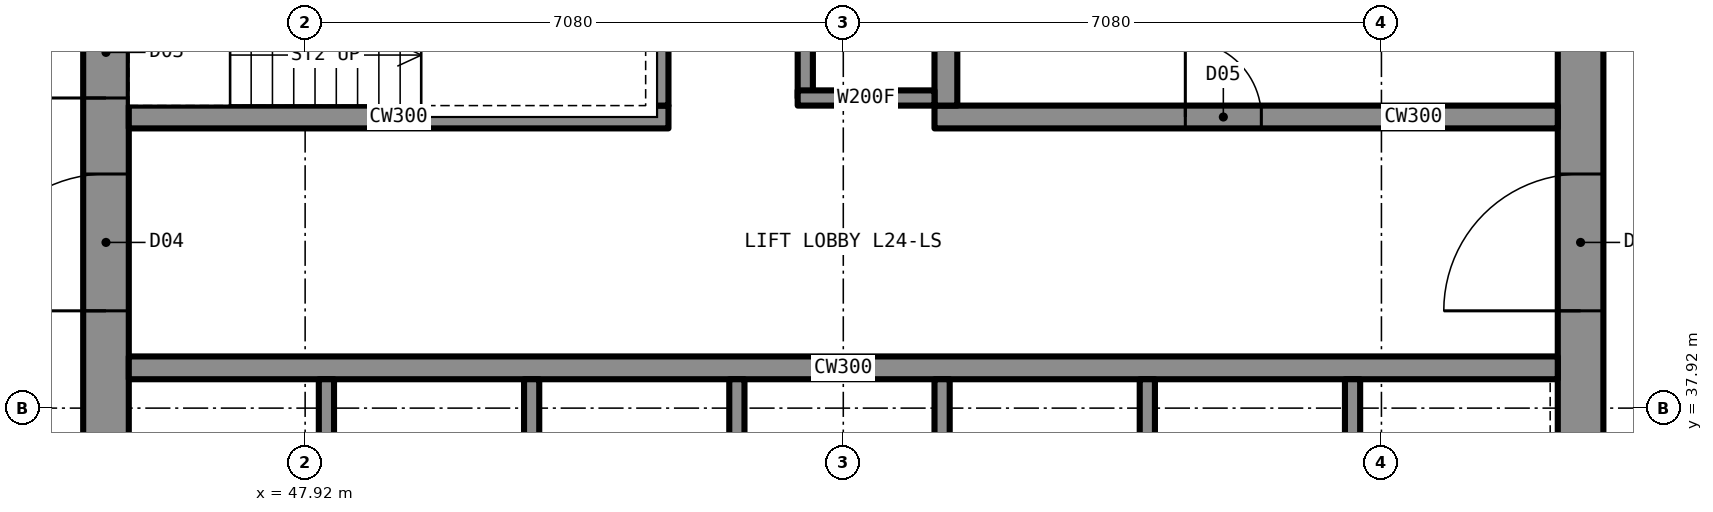
"""IFC4 building model, lengths in metres.
Left out: names, types, materials, properties, quantities, classifications, styles, units other than length and angle.
Written with IfcOpenShell. Run it as: python <this file> out.ifc"""

import sys

from ifc_helpers import new_model, si_unit, direction, frame, frame_2d, origin, place, context, subcontext, project, spatial, rectangle, extrude, element, fill, save


model = new_model("IFC4")
c1 = context("Model", 3, precision=1e-05, world=origin(), true_north=direction((0.0, 1.0)))
c2 = subcontext(c1, "Body", "Model", "MODEL_VIEW")
j1 = project(units=[si_unit("LENGTHUNIT", "METRE"), si_unit("PLANEANGLEUNIT", "RADIAN")], contexts=[c1])
p1 = place(None, origin())
s1 = spatial("IfcSite", under=j1, at=p1, CompositionType="ELEMENT")
p2 = place(p1, origin())
s2 = spatial("IfcBuilding", under=s1, at=p2, CompositionType="ELEMENT")
p3 = place(p2, frame((0.0, 0.0, 93.4)))
s3 = spatial("IfcBuildingStorey", under=s2, at=p3, CompositionType="ELEMENT", Elevation=93.4)
p4 = place(p3, frame((64.7, 35.6, 0.0), z_axis=(0.0, 0.0, 1.0), x_axis=(0.0, 1.0, 0.0)))
e1 = element("IfcWall", 1, at=p4, inside=s3, PredefinedType="SHEAR", context=c2, shape_type="SweptSolid", body=[
    extrude(rectangle(XDim=18.8, YDim=0.6, at=frame_2d((9.4, 0.0))), origin(), (0.0, 0.0, 1.0), 3.5),
])
p5 = place(p4, frame((13.4, 0.0, 0.0)))
e2 = element("IfcOpeningElement", 2, at=p5, cuts=e1, PredefinedType="OPENING", context=c2, shape_type="SweptSolid", body=[
    extrude(rectangle(XDim=1.8, YDim=2.2, at=frame_2d((0.9, 1.1))), frame((0.0, 0.31, 0.0), z_axis=(0.0, -1.0, 0.0), x_axis=(1.0, 0.0, 0.0)), (0.0, 0.0, 1.0), 0.62),
])
p6 = place(p4, frame((3.6, 0.0, 0.0)))
e3 = element("IfcOpeningElement", 3, at=p6, cuts=e1, PredefinedType="OPENING", context=c2, shape_type="SweptSolid", body=[
    extrude(rectangle(XDim=1.8, YDim=2.2, at=frame_2d((0.9, 1.1))), frame((0.0, 0.31, 0.0), z_axis=(0.0, -1.0, 0.0), x_axis=(1.0, 0.0, 0.0)), (0.0, 0.0, 1.0), 0.62),
])
p7 = place(p3, frame((45.3, 35.6, 0.0), z_axis=(0.0, 0.0, 1.0), x_axis=(0.0, 1.0, 0.0)))
e4 = element("IfcWall", 4, at=p7, inside=s3, PredefinedType="SHEAR", context=c2, shape_type="SweptSolid", body=[
    extrude(rectangle(XDim=18.8, YDim=0.6, at=frame_2d((9.4, 0.0))), origin(), (0.0, 0.0, 1.0), 3.5),
])
p8 = place(p7, frame((13.4, 0.0, 0.0)))
e5 = element("IfcOpeningElement", 5, at=p8, cuts=e4, PredefinedType="OPENING", context=c2, shape_type="SweptSolid", body=[
    extrude(rectangle(XDim=1.8, YDim=2.2, at=frame_2d((0.9, 1.1))), frame((0.0, 0.31, 0.0), z_axis=(0.0, -1.0, 0.0), x_axis=(1.0, 0.0, 0.0)), (0.0, 0.0, 1.0), 0.62),
])
p9 = place(p7, frame((3.6, 0.0, 0.0)))
e6 = element("IfcOpeningElement", 6, at=p9, cuts=e4, PredefinedType="OPENING", context=c2, shape_type="SweptSolid", body=[
    extrude(rectangle(XDim=1.8, YDim=2.2, at=frame_2d((0.9, 1.1))), frame((0.0, 0.31, 0.0), z_axis=(0.0, -1.0, 0.0), x_axis=(1.0, 0.0, 0.0)), (0.0, 0.0, 1.0), 0.62),
])
p10 = place(p7, frame((6.4, 0.0, 0.0)))
e7 = element("IfcOpeningElement", 7, at=p10, cuts=e4, PredefinedType="OPENING", context=c2, shape_type="SweptSolid", body=[
    extrude(rectangle(XDim=1.2, YDim=2.2, at=frame_2d((0.6, 1.1))), frame((0.0, 0.31, 0.0), z_axis=(0.0, -1.0, 0.0), x_axis=(1.0, 0.0, 0.0)), (0.0, 0.0, 1.0), 0.62),
])
p11 = place(p3, frame((45.6, 38.45, 0.0), z_axis=(0.0, 0.0, 1.0), x_axis=(1.0, 0.0, 0.0)))
e8 = element("IfcWall", 8, at=p11, inside=s3, PredefinedType="SHEAR", context=c2, shape_type="SweptSolid", body=[
    extrude(rectangle(XDim=18.8, YDim=0.3, at=frame_2d((9.4, 0.0))), origin(), (0.0, 0.0, 1.0), 3.5),
])
p12 = place(p3, frame((45.6, 41.75, 0.0), z_axis=(0.0, 0.0, 1.0), x_axis=(1.0, 0.0, 0.0)))
e9 = element("IfcWall", 9, at=p12, inside=s3, PredefinedType="SHEAR", context=c2, shape_type="SweptSolid", body=[
    extrude(rectangle(XDim=7.1, YDim=0.3, at=frame_2d((3.55, 0.0))), origin(), (0.0, 0.0, 1.0), 3.5),
])
p13 = place(p3, frame((56.2, 41.75, 0.0), z_axis=(0.0, 0.0, 1.0), x_axis=(1.0, 0.0, 0.0)))
e10 = element("IfcWall", 10, at=p13, inside=s3, PredefinedType="SHEAR", context=c2, shape_type="SweptSolid", body=[
    extrude(rectangle(XDim=8.2, YDim=0.3, at=frame_2d((4.1, 0.0))), origin(), (0.0, 0.0, 1.0), 3.5),
])
p14 = place(p13, frame((3.3, 0.0, 0.0)))
e11 = element("IfcOpeningElement", 11, at=p14, cuts=e10, PredefinedType="OPENING", context=c2, shape_type="SweptSolid", body=[
    extrude(rectangle(XDim=1.0, YDim=2.1, at=frame_2d((0.5, 1.05))), frame((0.0, 0.16, 0.0), z_axis=(0.0, -1.0, 0.0), x_axis=(1.0, 0.0, 0.0)), (0.0, 0.0, 1.0), 0.32),
])
p15 = place(p3, frame((52.55, 41.9, 0.0), z_axis=(0.0, 0.0, 1.0), x_axis=(0.0, 1.0, 0.0)))
e12 = element("IfcWall", 12, at=p15, inside=s3, PredefinedType="SHEAR", context=c2, shape_type="SweptSolid", body=[
    extrude(rectangle(XDim=6.2, YDim=0.3, at=frame_2d((3.1, 0.0))), origin(), (0.0, 0.0, 1.0), 3.5),
])
p16 = place(p15, frame((4.125, 0.0, 0.0)))
e13 = element("IfcOpeningElement", 13, at=p16, cuts=e12, PredefinedType="OPENING", context=c2, shape_type="SweptSolid", body=[
    extrude(rectangle(XDim=1.2, YDim=2.2, at=frame_2d((0.6, 1.1))), frame((0.0, 0.16, 0.0), z_axis=(0.0, -1.0, 0.0), x_axis=(1.0, 0.0, 0.0)), (0.0, 0.0, 1.0), 0.32),
])
p17 = place(p3, frame((56.35, 41.9, 0.0), z_axis=(0.0, 0.0, 1.0), x_axis=(0.0, 1.0, 0.0)))
e14 = element("IfcWall", 14, at=p17, inside=s3, PredefinedType="SHEAR", context=c2, shape_type="SweptSolid", body=[
    extrude(rectangle(XDim=9.5, YDim=0.3, at=frame_2d((4.75, 0.0))), origin(), (0.0, 0.0, 1.0), 3.5),
])
p18 = place(p17, frame((7.1, 0.0, 0.0)))
e15 = element("IfcOpeningElement", 15, at=p18, cuts=e14, PredefinedType="OPENING", context=c2, shape_type="SweptSolid", body=[
    extrude(rectangle(XDim=1.8, YDim=2.2, at=frame_2d((0.9, 1.1))), frame((0.0, 0.16, 0.0), z_axis=(0.0, -1.0, 0.0), x_axis=(1.0, 0.0, 0.0)), (0.0, 0.0, 1.0), 0.32),
])
p19 = place(p3, frame((54.5, 42.0, 0.0), z_axis=(0.0, 0.0, 1.0), x_axis=(0.0, 1.0, 0.0)))
e16 = element("IfcWall", 16, at=p19, inside=s3, PredefinedType="PARTITIONING", context=c2, shape_type="SweptSolid", body=[
    extrude(rectangle(XDim=3.1, YDim=0.2, at=frame_2d((1.55, 0.0))), origin(), (0.0, 0.0, 1.0), 3.33),
])
p20 = place(p19, frame((1.05, 0.0, 0.0)))
e17 = element("IfcOpeningElement", 17, at=p20, cuts=e16, PredefinedType="OPENING", context=c2, shape_type="SweptSolid", body=[
    extrude(rectangle(XDim=1.0, YDim=2.1, at=frame_2d((0.5, 1.05))), frame((0.0, 0.11, 0.0), z_axis=(0.0, -1.0, 0.0), x_axis=(1.0, 0.0, 0.0)), (0.0, 0.0, 1.0), 0.22),
])
p21 = place(p3, frame((54.4, 42.0, 0.0), z_axis=(0.0, 0.0, 1.0), x_axis=(1.0, 0.0, 0.0)))
e18 = element("IfcWall", 18, at=p21, inside=s3, PredefinedType="PARTITIONING", context=c2, shape_type="SweptSolid", body=[
    extrude(rectangle(XDim=1.8, YDim=0.2, at=frame_2d((0.9, 0.0))), origin(), (0.0, 0.0, 1.0), 3.33),
])
for number, where, z_axis, x_axis in (
    (19, (48.2, 35.6, 0.0), (0.0, 0.0, 1.0), (0.0, 1.0, 0.0)),
    (20, (50.9, 35.6, 0.0), (0.0, 0.0, 1.0), (0.0, 1.0, 0.0)),
    (21, (53.6, 35.6, 0.0), (0.0, 0.0, 1.0), (0.0, 1.0, 0.0)),
    (22, (56.3, 35.6, 0.0), (0.0, 0.0, 1.0), (0.0, 1.0, 0.0)),
    (23, (59.0, 35.6, 0.0), (0.0, 0.0, 1.0), (0.0, 1.0, 0.0)),
    (24, (61.7, 35.6, 0.0), (0.0, 0.0, 1.0), (0.0, 1.0, 0.0)),
):
    element("IfcWall", number, at=place(p3, frame(where, z_axis=z_axis, x_axis=x_axis)), inside=s3, PredefinedType="PARTITIONING", context=c2, shape_type="SweptSolid", body=[
        extrude(rectangle(XDim=2.7, YDim=0.2, at=frame_2d((1.35, 0.0))), origin(), (0.0, 0.0, 1.0), 3.33),
    ])
p22 = place(p9, origin())
e25 = element("IfcDoor", 25, at=p22, inside=s3, OperationType="DOUBLE_DOOR_SINGLE_SWING", PredefinedType="DOOR", context=c2, shape_type="SweptSolid", body=[
    extrude(rectangle(XDim=1.8, YDim=2.2, at=frame_2d((0.9, 1.1))), frame((0.0, 0.025, 0.0), z_axis=(0.0, -1.0, 0.0), x_axis=(1.0, 0.0, 0.0)), (0.0, 0.0, 1.0), 0.05),
])
fill(e6, e25)
p23 = place(p6, origin())
e26 = element("IfcDoor", 26, at=p23, inside=s3, OperationType="DOUBLE_DOOR_SINGLE_SWING", PredefinedType="DOOR", context=c2, shape_type="SweptSolid", body=[
    extrude(rectangle(XDim=1.8, YDim=2.2, at=frame_2d((0.9, 1.1))), frame((0.0, 0.025, 0.0), z_axis=(0.0, -1.0, 0.0), x_axis=(1.0, 0.0, 0.0)), (0.0, 0.0, 1.0), 0.05),
])
fill(e3, e26)
p24 = place(p10, origin())
e27 = element("IfcDoor", 27, at=p24, inside=s3, OperationType="SINGLE_SWING_LEFT", PredefinedType="DOOR", context=c2, shape_type="SweptSolid", body=[
    extrude(rectangle(XDim=1.2, YDim=2.2, at=frame_2d((0.6, 1.1))), frame((0.0, 0.025, 0.0), z_axis=(0.0, -1.0, 0.0), x_axis=(1.0, 0.0, 0.0)), (0.0, 0.0, 1.0), 0.05),
])
fill(e7, e27)
p25 = place(p14, origin())
e28 = element("IfcDoor", 28, at=p25, inside=s3, OperationType="SINGLE_SWING_LEFT", PredefinedType="DOOR", context=c2, shape_type="SweptSolid", body=[
    extrude(rectangle(XDim=1.0, YDim=2.1, at=frame_2d((0.5, 1.05))), frame((0.0, 0.025, 0.0), z_axis=(0.0, -1.0, 0.0), x_axis=(1.0, 0.0, 0.0)), (0.0, 0.0, 1.0), 0.05),
])
fill(e11, e28)
save(model, sys.argv[1])
